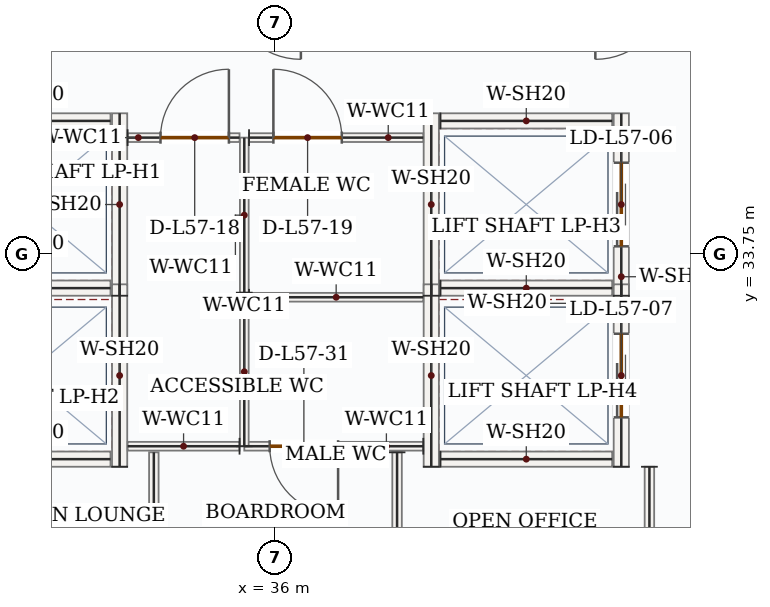
"""IFC4 building model, lengths in metres.
Left out: names, types, materials, properties, quantities, classifications, styles, units other than length and angle.
Written with IfcOpenShell. Run it as: python <this file> out.ifc"""

import sys

from ifc_helpers import new_model, si_unit, direction, frame, frame_2d, origin, place, context, subcontext, project, spatial, rectangle, extrude, source, transform, mapped, element, fill, save


model = new_model("IFC4")
c1 = context("Model", 3, precision=1e-05, world=origin(), true_north=direction((0.0, 1.0)))
c2 = subcontext(c1, "Body", "Model", "MODEL_VIEW")
j1 = project(units=[si_unit("LENGTHUNIT", "METRE"), si_unit("PLANEANGLEUNIT", "RADIAN")], contexts=[c1])
p1 = place(None, origin())
s1 = spatial("IfcSite", under=j1, at=p1, CompositionType="ELEMENT")
p2 = place(p1, origin())
s2 = spatial("IfcBuilding", under=s1, at=p2, CompositionType="ELEMENT")
p3 = place(p2, frame((0.0, 0.0, 242.85)))
s3 = spatial("IfcBuildingStorey", under=s2, at=p3, CompositionType="ELEMENT", Elevation=242.85)
m1 = source(origin(), c2, "Body", "SweptSolid", [
    extrude(rectangle(XDim=2.4, YDim=0.2, at=frame_2d((1.2, 0.0))), origin(), (0.0, 0.0, 1.0), 3.5),
])
p4 = place(p3, frame((33.95, 33.2, 0.0), z_axis=(0.0, 0.0, 1.0), x_axis=(0.0, 1.0, 0.0)))
e1 = element("IfcWall", 1, at=p4, inside=s3, PredefinedType="SOLIDWALL", context=c2, shape_type="MappedRepresentation", body=[
    mapped(m1, transform((0.0, 0.0, 0.0), x_axis=(1.0, 0.0, 0.0), y_axis=(0.0, 1.0, 0.0), z_axis=(0.0, 0.0, 1.0), scale=1.0)),
])
m2 = source(origin(), c2, "Body", "SweptSolid", [
    extrude(rectangle(XDim=2.26, YDim=0.2, at=frame_2d((1.13, 0.0))), origin(), (0.0, 0.0, 1.0), 3.5),
])
for number, where, z_axis, x_axis in (
    (2, (31.57, 33.3, 0.0), (0.0, 0.0, 1.0), (1.0, 0.0, 0.0)),
    (3, (31.57, 35.5, 0.0), (0.0, 0.0, 1.0), (1.0, 0.0, 0.0)),
):
    element("IfcWall", number, at=place(p3, frame(where, z_axis=z_axis, x_axis=x_axis)), inside=s3, PredefinedType="SOLIDWALL", context=c2, shape_type="MappedRepresentation", body=[
        mapped(m2, transform((0.0, 0.0, 0.0), x_axis=(1.0, 0.0, 0.0), y_axis=(0.0, 1.0, 0.0), z_axis=(0.0, 0.0, 1.0), scale=1.0)),
    ])
p5 = place(p3, frame((33.95, 30.95, 0.0), z_axis=(0.0, 0.0, 1.0), x_axis=(0.0, 1.0, 0.0)))
e4 = element("IfcWall", 4, at=p5, inside=s3, PredefinedType="SOLIDWALL", context=c2, shape_type="MappedRepresentation", body=[
    mapped(m1, transform((0.0, 0.0, 0.0), x_axis=(1.0, 0.0, 0.0), y_axis=(0.0, 1.0, 0.0), z_axis=(0.0, 0.0, 1.0), scale=1.0)),
])
p6 = place(p3, frame((31.57, 31.05, 0.0), z_axis=(0.0, 0.0, 1.0), x_axis=(1.0, 0.0, 0.0)))
e5 = element("IfcWall", 5, at=p6, inside=s3, PredefinedType="SOLIDWALL", context=c2, shape_type="MappedRepresentation", body=[
    mapped(m2, transform((0.0, 0.0, 0.0), x_axis=(1.0, 0.0, 0.0), y_axis=(0.0, 1.0, 0.0), z_axis=(0.0, 0.0, 1.0), scale=1.0)),
])
p7 = place(p3, frame((38.05, 33.2, 0.0), z_axis=(0.0, 0.0, 1.0), x_axis=(0.0, 1.0, 0.0)))
e6 = element("IfcWall", 6, at=p7, inside=s3, PredefinedType="SOLIDWALL", context=c2, shape_type="MappedRepresentation", body=[
    mapped(m1, transform((0.0, 0.0, 0.0), x_axis=(1.0, 0.0, 0.0), y_axis=(0.0, 1.0, 0.0), z_axis=(0.0, 0.0, 1.0), scale=1.0)),
])
p8 = place(p3, frame((40.55, 33.2, 0.0), z_axis=(0.0, 0.0, 1.0), x_axis=(0.0, 1.0, 0.0)))
e7 = element("IfcWall", 7, at=p8, inside=s3, PredefinedType="SOLIDWALL", context=c2, shape_type="SweptSolid", body=[
    extrude(rectangle(XDim=2.4, YDim=0.2, at=frame_2d((1.2, 0.0))), origin(), (0.0, 0.0, 1.0), 3.5),
])
p9 = place(p8, frame((0.65, 0.0, 0.0)))
e8 = element("IfcOpeningElement", 8, at=p9, cuts=e7, PredefinedType="OPENING", context=c2, shape_type="SweptSolid", body=[
    extrude(rectangle(XDim=1.1, YDim=2.15, at=frame_2d((0.55, 1.075))), frame((0.0, 0.11, 0.0), z_axis=(0.0, -1.0, 0.0), x_axis=(1.0, 0.0, 0.0)), (0.0, 0.0, 1.0), 0.22),
])
for number, where, z_axis, x_axis in (
    (9, (38.17, 33.3, 0.0), (0.0, 0.0, 1.0), (1.0, 0.0, 0.0)),
    (10, (38.17, 35.5, 0.0), (0.0, 0.0, 1.0), (1.0, 0.0, 0.0)),
):
    element("IfcWall", number, at=place(p3, frame(where, z_axis=z_axis, x_axis=x_axis)), inside=s3, PredefinedType="SOLIDWALL", context=c2, shape_type="MappedRepresentation", body=[
        mapped(m2, transform((0.0, 0.0, 0.0), x_axis=(1.0, 0.0, 0.0), y_axis=(0.0, 1.0, 0.0), z_axis=(0.0, 0.0, 1.0), scale=1.0)),
    ])
p10 = place(p3, frame((38.05, 30.95, 0.0), z_axis=(0.0, 0.0, 1.0), x_axis=(0.0, 1.0, 0.0)))
e11 = element("IfcWall", 11, at=p10, inside=s3, PredefinedType="SOLIDWALL", context=c2, shape_type="MappedRepresentation", body=[
    mapped(m1, transform((0.0, 0.0, 0.0), x_axis=(1.0, 0.0, 0.0), y_axis=(0.0, 1.0, 0.0), z_axis=(0.0, 0.0, 1.0), scale=1.0)),
])
p11 = place(p3, frame((40.55, 30.95, 0.0), z_axis=(0.0, 0.0, 1.0), x_axis=(0.0, 1.0, 0.0)))
e12 = element("IfcWall", 12, at=p11, inside=s3, PredefinedType="SOLIDWALL", context=c2, shape_type="SweptSolid", body=[
    extrude(rectangle(XDim=2.4, YDim=0.2, at=frame_2d((1.2, 0.0))), origin(), (0.0, 0.0, 1.0), 3.5),
])
p12 = place(p11, frame((0.65, 0.0, 0.0)))
e13 = element("IfcOpeningElement", 13, at=p12, cuts=e12, PredefinedType="OPENING", context=c2, shape_type="SweptSolid", body=[
    extrude(rectangle(XDim=1.1, YDim=2.15, at=frame_2d((0.55, 1.075))), frame((0.0, 0.11, 0.0), z_axis=(0.0, -1.0, 0.0), x_axis=(1.0, 0.0, 0.0)), (0.0, 0.0, 1.0), 0.22),
])
p13 = place(p3, frame((38.17, 31.05, 0.0), z_axis=(0.0, 0.0, 1.0), x_axis=(1.0, 0.0, 0.0)))
e14 = element("IfcWall", 14, at=p13, inside=s3, PredefinedType="SOLIDWALL", context=c2, shape_type="MappedRepresentation", body=[
    mapped(m2, transform((0.0, 0.0, 0.0), x_axis=(1.0, 0.0, 0.0), y_axis=(0.0, 1.0, 0.0), z_axis=(0.0, 0.0, 1.0), scale=1.0)),
])
p14 = place(p3, frame((37.945, 31.22, 0.0), z_axis=(0.0, 0.0, 1.0), x_axis=(-1.0, 0.0, 0.0)))
e15 = element("IfcWall", 15, at=p14, inside=s3, PredefinedType="PARTITIONING", context=c2, shape_type="SweptSolid", body=[
    extrude(rectangle(XDim=2.355, YDim=0.115, at=frame_2d((1.177, 0.0))), origin(), (0.0, 0.0, 1.0), 3.5),
])
p15 = place(p14, frame((1.121, 0.0, 0.0)))
e16 = element("IfcOpeningElement", 16, at=p15, cuts=e15, PredefinedType="OPENING", context=c2, shape_type="SweptSolid", body=[
    extrude(rectangle(XDim=0.9, YDim=2.1, at=frame_2d((0.45, 1.05))), frame((0.0, 0.067, 0.0), z_axis=(0.0, -1.0, 0.0), x_axis=(1.0, 0.0, 0.0)), (0.0, 0.0, 1.0), 0.135),
])
m3 = source(origin(), c2, "Body", "SweptSolid", [
    extrude(rectangle(XDim=1.96, YDim=0.115, at=frame_2d((0.98, 0.0))), origin(), (0.0, 0.0, 1.0), 3.5),
])
p16 = place(p3, frame((35.59, 31.22, 0.0), z_axis=(0.0, 0.0, 1.0), x_axis=(0.0, 1.0, 0.0)))
e17 = element("IfcWall", 17, at=p16, inside=s3, PredefinedType="PARTITIONING", context=c2, shape_type="MappedRepresentation", body=[
    mapped(m3, transform((0.0, 0.0, 0.0), x_axis=(1.0, 0.0, 0.0), y_axis=(0.0, 1.0, 0.0), z_axis=(0.0, 0.0, 1.0), scale=1.0)),
])
m4 = source(origin(), c2, "Body", "SweptSolid", [
    extrude(rectangle(XDim=2.292, YDim=0.115, at=frame_2d((1.146, 0.0))), origin(), (0.0, 0.0, 1.0), 3.5),
])
p17 = place(p3, frame((35.653, 33.18, 0.0), z_axis=(0.0, 0.0, 1.0), x_axis=(1.0, 0.0, 0.0)))
e18 = element("IfcWall", 18, at=p17, inside=s3, PredefinedType="PARTITIONING", context=c2, shape_type="MappedRepresentation", body=[
    mapped(m4, transform((0.0, 0.0, 0.0), x_axis=(1.0, 0.0, 0.0), y_axis=(0.0, 1.0, 0.0), z_axis=(0.0, 0.0, 1.0), scale=1.0)),
])
m5 = source(origin(), c2, "Body", "SweptSolid", [
    extrude(rectangle(XDim=2.04, YDim=0.115, at=frame_2d((1.02, 0.0))), origin(), (0.0, 0.0, 1.0), 3.5),
])
p18 = place(p3, frame((35.59, 33.24, 0.0), z_axis=(0.0, 0.0, 1.0), x_axis=(0.0, 1.0, 0.0)))
e19 = element("IfcWall", 19, at=p18, inside=s3, PredefinedType="PARTITIONING", context=c2, shape_type="MappedRepresentation", body=[
    mapped(m5, transform((0.0, 0.0, 0.0), x_axis=(1.0, 0.0, 0.0), y_axis=(0.0, 1.0, 0.0), z_axis=(0.0, 0.0, 1.0), scale=1.0)),
])
p19 = place(p3, frame((35.653, 35.28, 0.0), z_axis=(0.0, 0.0, 1.0), x_axis=(1.0, 0.0, 0.0)))
e20 = element("IfcWall", 20, at=p19, inside=s3, PredefinedType="PARTITIONING", context=c2, shape_type="SweptSolid", body=[
    extrude(rectangle(XDim=2.292, YDim=0.115, at=frame_2d((1.146, 0.0))), origin(), (0.0, 0.0, 1.0), 3.5),
])
p20 = place(p19, frame((0.32, 0.0, 0.0)))
e21 = element("IfcOpeningElement", 21, at=p20, cuts=e20, PredefinedType="OPENING", context=c2, shape_type="SweptSolid", body=[
    extrude(rectangle(XDim=0.9, YDim=2.1, at=frame_2d((0.45, 1.05))), frame((0.0, 0.067, 0.0), z_axis=(0.0, -1.0, 0.0), x_axis=(1.0, 0.0, 0.0)), (0.0, 0.0, 1.0), 0.135),
])
m6 = source(origin(), c2, "Body", "SweptSolid", [
    extrude(rectangle(XDim=1.473, YDim=0.115, at=frame_2d((0.736, 0.0))), origin(), (0.0, 0.0, 1.0), 3.5),
])
p21 = place(p3, frame((35.528, 31.22, 0.0), z_axis=(0.0, 0.0, 1.0), x_axis=(-1.0, 0.0, 0.0)))
e22 = element("IfcWall", 22, at=p21, inside=s3, PredefinedType="PARTITIONING", context=c2, shape_type="MappedRepresentation", body=[
    mapped(m6, transform((0.0, 0.0, 0.0), x_axis=(1.0, 0.0, 0.0), y_axis=(0.0, 1.0, 0.0), z_axis=(0.0, 0.0, 1.0), scale=1.0)),
])
p22 = place(p3, frame((34.055, 35.28, 0.0), z_axis=(0.0, 0.0, 1.0), x_axis=(1.0, 0.0, 0.0)))
e23 = element("IfcWall", 23, at=p22, inside=s3, PredefinedType="PARTITIONING", context=c2, shape_type="SweptSolid", body=[
    extrude(rectangle(XDim=1.473, YDim=0.115, at=frame_2d((0.736, 0.0))), origin(), (0.0, 0.0, 1.0), 3.5),
])
p23 = place(p22, frame((0.433, 0.0, 0.0)))
e24 = element("IfcOpeningElement", 24, at=p23, cuts=e23, PredefinedType="OPENING", context=c2, shape_type="SweptSolid", body=[
    extrude(rectangle(XDim=0.9, YDim=2.1, at=frame_2d((0.45, 1.05))), frame((0.0, 0.067, 0.0), z_axis=(0.0, -1.0, 0.0), x_axis=(1.0, 0.0, 0.0)), (0.0, 0.0, 1.0), 0.135),
])
m7 = source(origin(), c2, "Body", "SweptSolid", [
    extrude(rectangle(XDim=3.2, YDim=0.125, at=frame_2d((1.6, 0.0))), origin(), (0.0, 0.0, 1.0), 3.5),
])
for number, where, z_axis, x_axis in (
    (25, (34.4, 27.94, 0.0), (0.0, 0.0, 1.0), (0.0, 1.0, 0.0)),
    (26, (37.6, 31.14, 0.0), (0.0, 0.0, 1.0), (0.0, -1.0, 0.0)),
):
    element("IfcWall", number, at=place(p3, frame(where, z_axis=z_axis, x_axis=x_axis)), inside=s3, PredefinedType="PARTITIONING", context=c2, shape_type="MappedRepresentation", body=[
        mapped(m7, transform((0.0, 0.0, 0.0), x_axis=(1.0, 0.0, 0.0), y_axis=(0.0, 1.0, 0.0), z_axis=(0.0, 0.0, 1.0), scale=1.0)),
    ])
m8 = source(origin(), c2, "Body", "SweptSolid", [
    extrude(rectangle(XDim=3.01, YDim=0.125, at=frame_2d((1.505, 0.0))), origin(), (0.0, 0.0, 1.0), 3.5),
])
p24 = place(p3, frame((40.92, 30.95, 0.0), z_axis=(0.0, 0.0, 1.0), x_axis=(0.0, -1.0, 0.0)))
e27 = element("IfcWall", 27, at=p24, inside=s3, PredefinedType="PARTITIONING", context=c2, shape_type="MappedRepresentation", body=[
    mapped(m8, transform((0.0, 0.0, 0.0), x_axis=(1.0, 0.0, 0.0), y_axis=(0.0, 1.0, 0.0), z_axis=(0.0, 0.0, 1.0), scale=1.0)),
])
m9 = source(origin(), c2, "Body", "SweptSolid", [
    extrude(rectangle(XDim=1.1, YDim=2.15, at=frame_2d((0.55, 1.075))), frame((0.0, 0.025, 0.0), z_axis=(0.0, -1.0, 0.0), x_axis=(1.0, 0.0, 0.0)), (0.0, 0.0, 1.0), 0.05),
])
p25 = place(p9, origin())
e28 = element("IfcDoor", 28, at=p25, inside=s3, OperationType="DOUBLE_DOOR_SLIDING", PredefinedType="DOOR", context=c2, shape_type="MappedRepresentation", body=[
    mapped(m9, transform((0.0, 0.0, 0.0), x_axis=(1.0, 0.0, 0.0), y_axis=(0.0, 1.0, 0.0), z_axis=(0.0, 0.0, 1.0), scale=1.0)),
])
fill(e8, e28)
p26 = place(p12, origin())
e29 = element("IfcDoor", 29, at=p26, inside=s3, OperationType="DOUBLE_DOOR_SLIDING", PredefinedType="DOOR", context=c2, shape_type="MappedRepresentation", body=[
    mapped(m9, transform((0.0, 0.0, 0.0), x_axis=(1.0, 0.0, 0.0), y_axis=(0.0, 1.0, 0.0), z_axis=(0.0, 0.0, 1.0), scale=1.0)),
])
fill(e13, e29)
m10 = source(origin(), c2, "Body", "SweptSolid", [
    extrude(rectangle(XDim=0.9, YDim=2.1, at=frame_2d((0.45, 1.05))), frame((0.0, 0.025, 0.0), z_axis=(0.0, -1.0, 0.0), x_axis=(1.0, 0.0, 0.0)), (0.0, 0.0, 1.0), 0.05),
])
p27 = place(p23, origin())
e30 = element("IfcDoor", 30, at=p27, inside=s3, OperationType="SINGLE_SWING_RIGHT", PredefinedType="DOOR", context=c2, shape_type="MappedRepresentation", body=[
    mapped(m10, transform((0.0, 0.0, 0.0), x_axis=(1.0, 0.0, 0.0), y_axis=(0.0, 1.0, 0.0), z_axis=(0.0, 0.0, 1.0), scale=1.0)),
])
fill(e24, e30)
p28 = place(p20, origin())
e31 = element("IfcDoor", 31, at=p28, inside=s3, OperationType="SINGLE_SWING_LEFT", PredefinedType="DOOR", context=c2, shape_type="MappedRepresentation", body=[
    mapped(m10, transform((0.0, 0.0, 0.0), x_axis=(1.0, 0.0, 0.0), y_axis=(0.0, 1.0, 0.0), z_axis=(0.0, 0.0, 1.0), scale=1.0)),
])
fill(e21, e31)
p29 = place(p15, origin())
e32 = element("IfcDoor", 32, at=p29, inside=s3, OperationType="SINGLE_SWING_LEFT", PredefinedType="DOOR", context=c2, shape_type="MappedRepresentation", body=[
    mapped(m10, transform((0.0, 0.0, 0.0), x_axis=(1.0, 0.0, 0.0), y_axis=(0.0, 1.0, 0.0), z_axis=(0.0, 0.0, 1.0), scale=1.0)),
])
fill(e16, e32)
save(model, sys.argv[1])
